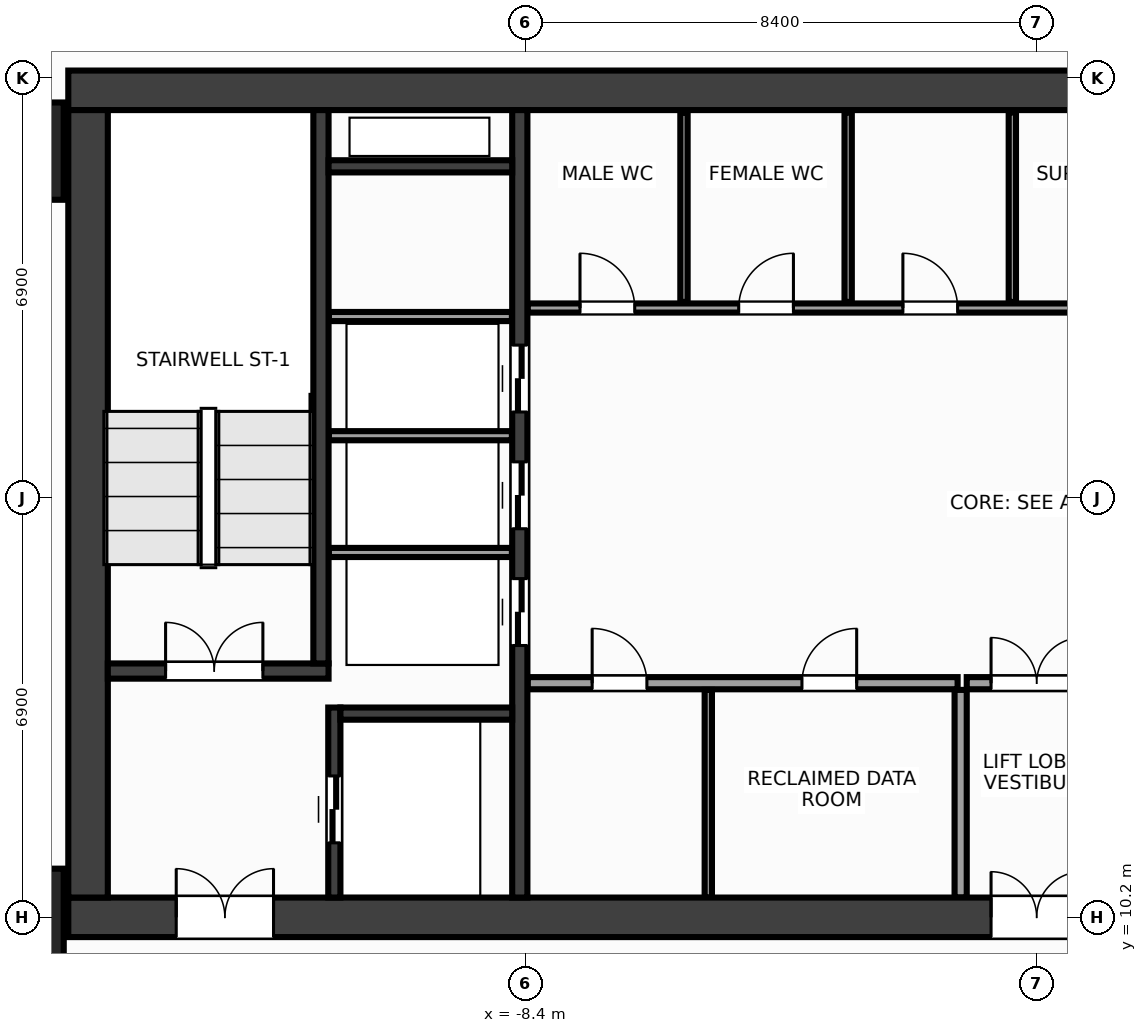
"""IFC4 building model, lengths in metres.
Left out: names, types, materials, properties, quantities, classifications, styles, units other than length and angle.
Written with IfcOpenShell. Run it as: python <this file> out.ifc"""

import sys

from ifc_helpers import new_model, si_unit, direction, frame, frame_2d, origin, origin_2d, place, context, subcontext, project, spatial, rectangle, extrude, source, transform, mapped, element, fill, save


model = new_model("IFC4")
c1 = context("Model", 3, precision=1e-05, world=origin(), true_north=direction((0.0, 1.0)))
c2 = subcontext(c1, "Body", "Model", "MODEL_VIEW")
j1 = project(units=[si_unit("LENGTHUNIT", "METRE"), si_unit("PLANEANGLEUNIT", "RADIAN")], contexts=[c1])
p1 = place(None, origin())
s1 = spatial("IfcSite", under=j1, at=p1, CompositionType="ELEMENT")
p2 = place(p1, origin())
s2 = spatial("IfcBuilding", under=s1, at=p2, CompositionType="ELEMENT")
p3 = place(p2, frame((0.0, 0.0, 182.0)))
s3 = spatial("IfcBuildingStorey", under=s2, at=p3, CompositionType="ELEMENT", Elevation=182.0)
m1 = source(origin(), c2, "Body", "SweptSolid", [
    extrude(rectangle(XDim=31.85, YDim=0.65, at=frame_2d((15.925, 0.0))), origin(), (0.0, 0.0, 1.0), 3.6),
])
p4 = place(p3, frame((-15.925, 23.8, 0.0), z_axis=(0.0, 0.0, 1.0), x_axis=(1.0, 0.0, 0.0)))
e1 = element("IfcWall", 1, at=p4, inside=s3, PredefinedType="SHEAR", context=c2, shape_type="MappedRepresentation", body=[
    mapped(m1, transform((0.0, 0.0, 0.0), x_axis=(1.0, 0.0, 0.0), y_axis=(0.0, 1.0, 0.0), z_axis=(0.0, 0.0, 1.0), scale=1.0)),
])
p5 = place(p3, frame((-15.925, 10.2, 0.0), z_axis=(0.0, 0.0, 1.0), x_axis=(1.0, 0.0, 0.0)))
e2 = element("IfcWall", 2, at=p5, inside=s3, PredefinedType="SHEAR", context=c2, shape_type="MappedRepresentation", body=[
    mapped(m1, transform((0.0, 0.0, 0.0), x_axis=(1.0, 0.0, 0.0), y_axis=(0.0, 1.0, 0.0), z_axis=(0.0, 0.0, 1.0), scale=1.0)),
])
p6 = place(p5, frame((1.775, 0.0, 0.0)))
e3 = element("IfcOpeningElement", 3, at=p6, cuts=e2, PredefinedType="OPENING", context=c2, shape_type="SweptSolid", body=[
    extrude(rectangle(XDim=1.6, YDim=2.15, at=frame_2d((0.8, 1.075))), frame((0.0, 0.337, 0.0), z_axis=(0.0, -1.0, 0.0), x_axis=(1.0, 0.0, 0.0)), (0.0, 0.0, 1.0), 0.674),
])
p7 = place(p5, frame((28.475, 0.0, 0.0)))
e4 = element("IfcOpeningElement", 4, at=p7, cuts=e2, PredefinedType="OPENING", context=c2, shape_type="SweptSolid", body=[
    extrude(rectangle(XDim=1.6, YDim=2.15, at=frame_2d((0.8, 1.075))), frame((0.0, 0.337, 0.0), z_axis=(0.0, -1.0, 0.0), x_axis=(1.0, 0.0, 0.0)), (0.0, 0.0, 1.0), 0.674),
])
p8 = place(p5, frame((15.175, 0.0, 0.0)))
e5 = element("IfcOpeningElement", 5, at=p8, cuts=e2, PredefinedType="OPENING", context=c2, shape_type="SweptSolid", body=[
    extrude(rectangle(XDim=1.5, YDim=2.2, at=frame_2d((0.75, 1.1))), frame((0.0, 0.337, 0.0), z_axis=(0.0, -1.0, 0.0), x_axis=(1.0, 0.0, 0.0)), (0.0, 0.0, 1.0), 0.674),
])
m2 = source(origin(), c2, "Body", "SweptSolid", [
    extrude(rectangle(XDim=12.95, YDim=0.65, at=frame_2d((6.475, 0.0))), origin(), (0.0, 0.0, 1.0), 3.6),
])
p9 = place(p3, frame((-15.6, 10.525, 0.0), z_axis=(0.0, 0.0, 1.0), x_axis=(0.0, 1.0, 0.0)))
e6 = element("IfcWall", 6, at=p9, inside=s3, PredefinedType="SHEAR", context=c2, shape_type="MappedRepresentation", body=[
    mapped(m2, transform((0.0, 0.0, 0.0), x_axis=(1.0, 0.0, 0.0), y_axis=(0.0, 1.0, 0.0), z_axis=(0.0, 0.0, 1.0), scale=1.0)),
])
m3 = source(origin(), c2, "Body", "SweptSolid", [
    extrude(rectangle(XDim=12.95, YDim=0.25, at=frame_2d((6.475, 0.0))), origin(), (0.0, 0.0, 1.0), 3.6),
])
p10 = place(p3, frame((-8.5, 10.525, 0.0), z_axis=(0.0, 0.0, 1.0), x_axis=(0.0, 1.0, 0.0)))
e7 = element("IfcWall", 7, at=p10, inside=s3, PredefinedType="SHEAR", context=c2, shape_type="MappedRepresentation", body=[
    mapped(m3, transform((0.0, 0.0, 0.0), x_axis=(1.0, 0.0, 0.0), y_axis=(0.0, 1.0, 0.0), z_axis=(0.0, 0.0, 1.0), scale=1.0)),
])
p11 = place(p10, frame((4.145, 0.0, 0.0)))
e8 = element("IfcOpeningElement", 8, at=p11, cuts=e7, PredefinedType="OPENING", context=c2, shape_type="SweptSolid", body=[
    extrude(rectangle(XDim=1.1, YDim=2.15, at=frame_2d((0.55, 1.075))), frame((0.0, 0.137, 0.0), z_axis=(0.0, -1.0, 0.0), x_axis=(1.0, 0.0, 0.0)), (0.0, 0.0, 1.0), 0.274),
])
p12 = place(p10, frame((6.065, 0.0, 0.0)))
e9 = element("IfcOpeningElement", 9, at=p12, cuts=e7, PredefinedType="OPENING", context=c2, shape_type="SweptSolid", body=[
    extrude(rectangle(XDim=1.1, YDim=2.15, at=frame_2d((0.55, 1.075))), frame((0.0, 0.137, 0.0), z_axis=(0.0, -1.0, 0.0), x_axis=(1.0, 0.0, 0.0)), (0.0, 0.0, 1.0), 0.274),
])
p13 = place(p10, frame((7.985, 0.0, 0.0)))
e10 = element("IfcOpeningElement", 10, at=p13, cuts=e7, PredefinedType="OPENING", context=c2, shape_type="SweptSolid", body=[
    extrude(rectangle(XDim=1.1, YDim=2.15, at=frame_2d((0.55, 1.075))), frame((0.0, 0.137, 0.0), z_axis=(0.0, -1.0, 0.0), x_axis=(1.0, 0.0, 0.0)), (0.0, 0.0, 1.0), 0.274),
])
m4 = source(origin(), c2, "Body", "SweptSolid", [
    extrude(rectangle(XDim=3.63, YDim=0.25, at=frame_2d((1.815, 0.0))), origin(), (0.0, 0.0, 1.0), 3.6),
])
p14 = place(p3, frame((-15.275, 14.25, 0.0), z_axis=(0.0, 0.0, 1.0), x_axis=(1.0, 0.0, 0.0)))
e11 = element("IfcWall", 11, at=p14, inside=s3, PredefinedType="SHEAR", context=c2, shape_type="MappedRepresentation", body=[
    mapped(m4, transform((0.0, 0.0, 0.0), x_axis=(1.0, 0.0, 0.0), y_axis=(0.0, 1.0, 0.0), z_axis=(0.0, 0.0, 1.0), scale=1.0)),
])
p15 = place(p14, frame((0.95, 0.0, 0.0)))
e12 = element("IfcOpeningElement", 12, at=p15, cuts=e11, PredefinedType="OPENING", context=c2, shape_type="SweptSolid", body=[
    extrude(rectangle(XDim=1.6, YDim=2.15, at=frame_2d((0.8, 1.075))), frame((0.0, 0.137, 0.0), z_axis=(0.0, -1.0, 0.0), x_axis=(1.0, 0.0, 0.0)), (0.0, 0.0, 1.0), 0.274),
])
m5 = source(origin(), c2, "Body", "SweptSolid", [
    extrude(rectangle(XDim=9.1, YDim=0.25, at=frame_2d((4.55, 0.0))), origin(), (0.0, 0.0, 1.0), 3.6),
])
p16 = place(p3, frame((-11.77, 14.375, 0.0), z_axis=(0.0, 0.0, 1.0), x_axis=(0.0, 1.0, 0.0)))
e13 = element("IfcWall", 13, at=p16, inside=s3, PredefinedType="SHEAR", context=c2, shape_type="MappedRepresentation", body=[
    mapped(m5, transform((0.0, 0.0, 0.0), x_axis=(1.0, 0.0, 0.0), y_axis=(0.0, 1.0, 0.0), z_axis=(0.0, 0.0, 1.0), scale=1.0)),
])
m6 = source(origin(), c2, "Body", "SweptSolid", [
    extrude(rectangle(XDim=3.125, YDim=0.2, at=frame_2d((1.562, 0.0))), origin(), (0.0, 0.0, 1.0), 3.6),
])
p17 = place(p3, frame((-11.55, 10.525, 0.0), z_axis=(0.0, 0.0, 1.0), x_axis=(0.0, 1.0, 0.0)))
e14 = element("IfcWall", 14, at=p17, inside=s3, PredefinedType="SHEAR", context=c2, shape_type="MappedRepresentation", body=[
    mapped(m6, transform((0.0, 0.0, 0.0), x_axis=(1.0, 0.0, 0.0), y_axis=(0.0, 1.0, 0.0), z_axis=(0.0, 0.0, 1.0), scale=1.0)),
])
p18 = place(p17, frame((0.9, 0.0, 0.0)))
e15 = element("IfcOpeningElement", 15, at=p18, cuts=e14, PredefinedType="OPENING", context=c2, shape_type="SweptSolid", body=[
    extrude(rectangle(XDim=1.1, YDim=2.15, at=frame_2d((0.55, 1.075))), frame((0.0, 0.112, 0.0), z_axis=(0.0, -1.0, 0.0), x_axis=(1.0, 0.0, 0.0)), (0.0, 0.0, 1.0), 0.224),
])
m7 = source(origin(), c2, "Body", "SweptSolid", [
    extrude(rectangle(XDim=2.825, YDim=0.2, at=frame_2d((1.413, 0.0))), origin(), (0.0, 0.0, 1.0), 3.6),
])
p19 = place(p3, frame((-11.45, 13.55, 0.0), z_axis=(0.0, 0.0, 1.0), x_axis=(1.0, 0.0, 0.0)))
e16 = element("IfcWall", 16, at=p19, inside=s3, PredefinedType="SHEAR", context=c2, shape_type="MappedRepresentation", body=[
    mapped(m7, transform((0.0, 0.0, 0.0), x_axis=(1.0, 0.0, 0.0), y_axis=(0.0, 1.0, 0.0), z_axis=(0.0, 0.0, 1.0), scale=1.0)),
])
m8 = source(origin(), c2, "Body", "SweptSolid", [
    extrude(rectangle(XDim=3.02, YDim=0.2, at=frame_2d((1.51, 0.0))), origin(), (0.0, 0.0, 1.0), 3.6),
])
p20 = place(p3, frame((-11.645, 22.55, 0.0), z_axis=(0.0, 0.0, 1.0), x_axis=(1.0, 0.0, 0.0)))
e17 = element("IfcWall", 17, at=p20, inside=s3, PredefinedType="SHEAR", context=c2, shape_type="MappedRepresentation", body=[
    mapped(m8, transform((0.0, 0.0, 0.0), x_axis=(1.0, 0.0, 0.0), y_axis=(0.0, 1.0, 0.0), z_axis=(0.0, 0.0, 1.0), scale=1.0)),
])
m9 = source(origin(), c2, "Body", "SweptSolid", [
    extrude(rectangle(XDim=1.6, YDim=1.6, at=origin_2d()), origin(), (0.0, 0.0, 1.0), 3.6),
])
for number, where, z_axis, x_axis in (
    (18, (-16.8, 10.2, 0.0), (0.0, 0.0, 1.0), (1.0, 0.0, 0.0)),
    (19, (-16.8, 22.8, 0.0), (0.0, 0.0, 1.0), (1.0, 0.0, 0.0)),
):
    element("IfcColumn", number, at=place(p3, frame(where, z_axis=z_axis, x_axis=x_axis)), inside=s3, PredefinedType="COLUMN", context=c2, shape_type="MappedRepresentation", body=[
        mapped(m9, transform((0.0, 0.0, 0.0), x_axis=(1.0, 0.0, 0.0), y_axis=(0.0, 1.0, 0.0), z_axis=(0.0, 0.0, 1.0), scale=1.0)),
    ])
m10 = source(origin(), c2, "Body", "SweptSolid", [
    extrude(rectangle(XDim=3.01, YDim=0.15, at=frame_2d((1.505, 0.0))), origin(), (0.0, 0.0, 1.0), 3.38),
])
for number, where, z_axis, x_axis in (
    (20, (-11.64, 16.2, 0.0), (0.0, 0.0, 1.0), (1.0, 0.0, 0.0)),
    (21, (-11.64, 18.12, 0.0), (0.0, 0.0, 1.0), (1.0, 0.0, 0.0)),
    (22, (-11.64, 20.08, 0.0), (0.0, 0.0, 1.0), (1.0, 0.0, 0.0)),
):
    element("IfcWall", number, at=place(p3, frame(where, z_axis=z_axis, x_axis=x_axis)), inside=s3, PredefinedType="PARTITIONING", context=c2, shape_type="MappedRepresentation", body=[
        mapped(m10, transform((0.0, 0.0, 0.0), x_axis=(1.0, 0.0, 0.0), y_axis=(0.0, 1.0, 0.0), z_axis=(0.0, 0.0, 1.0), scale=1.0)),
    ])
m11 = source(origin(), c2, "Body", "SweptSolid", [
    extrude(rectangle(XDim=7.07, YDim=0.2, at=frame_2d((3.535, 0.0))), origin(), (0.0, 0.0, 1.0), 3.38),
])
p21 = place(p3, frame((-8.37, 14.05, 0.0), z_axis=(0.0, 0.0, 1.0), x_axis=(1.0, 0.0, 0.0)))
e23 = element("IfcWall", 23, at=p21, inside=s3, PredefinedType="PARTITIONING", context=c2, shape_type="MappedRepresentation", body=[
    mapped(m11, transform((0.0, 0.0, 0.0), x_axis=(1.0, 0.0, 0.0), y_axis=(0.0, 1.0, 0.0), z_axis=(0.0, 0.0, 1.0), scale=1.0)),
])
p22 = place(p21, frame((1.06, 0.0, 0.0)))
e24 = element("IfcOpeningElement", 24, at=p22, cuts=e23, PredefinedType="OPENING", context=c2, shape_type="SweptSolid", body=[
    extrude(rectangle(XDim=0.9, YDim=2.15, at=frame_2d((0.45, 1.075))), frame((0.0, 0.112, 0.0), z_axis=(0.0, -1.0, 0.0), x_axis=(1.0, 0.0, 0.0)), (0.0, 0.0, 1.0), 0.224),
])
p23 = place(p21, frame((4.51, 0.0, 0.0)))
e25 = element("IfcOpeningElement", 25, at=p23, cuts=e23, PredefinedType="OPENING", context=c2, shape_type="SweptSolid", body=[
    extrude(rectangle(XDim=0.9, YDim=2.15, at=frame_2d((0.45, 1.075))), frame((0.0, 0.112, 0.0), z_axis=(0.0, -1.0, 0.0), x_axis=(1.0, 0.0, 0.0)), (0.0, 0.0, 1.0), 0.224),
])
m12 = source(origin(), c2, "Body", "SweptSolid", [
    extrude(rectangle(XDim=3.415, YDim=0.2, at=frame_2d((1.708, 0.0))), origin(), (0.0, 0.0, 1.0), 3.38),
])
p24 = place(p3, frame((-1.25, 10.525, 0.0), z_axis=(0.0, 0.0, 1.0), x_axis=(0.0, 1.0, 0.0)))
e26 = element("IfcWall", 26, at=p24, inside=s3, PredefinedType="PARTITIONING", context=c2, shape_type="MappedRepresentation", body=[
    mapped(m12, transform((0.0, 0.0, 0.0), x_axis=(1.0, 0.0, 0.0), y_axis=(0.0, 1.0, 0.0), z_axis=(0.0, 0.0, 1.0), scale=1.0)),
])
m13 = source(origin(), c2, "Body", "SweptSolid", [
    extrude(rectangle(XDim=2.3, YDim=0.2, at=frame_2d((1.15, 0.0))), origin(), (0.0, 0.0, 1.0), 3.38),
])
p25 = place(p3, frame((-1.15, 14.05, 0.0), z_axis=(0.0, 0.0, 1.0), x_axis=(1.0, 0.0, 0.0)))
e27 = element("IfcWall", 27, at=p25, inside=s3, PredefinedType="PARTITIONING", context=c2, shape_type="MappedRepresentation", body=[
    mapped(m13, transform((0.0, 0.0, 0.0), x_axis=(1.0, 0.0, 0.0), y_axis=(0.0, 1.0, 0.0), z_axis=(0.0, 0.0, 1.0), scale=1.0)),
])
p26 = place(p25, frame((0.4, 0.0, 0.0)))
e28 = element("IfcOpeningElement", 28, at=p26, cuts=e27, PredefinedType="OPENING", context=c2, shape_type="SweptSolid", body=[
    extrude(rectangle(XDim=1.5, YDim=2.2, at=frame_2d((0.75, 1.1))), frame((0.0, 0.112, 0.0), z_axis=(0.0, -1.0, 0.0), x_axis=(1.0, 0.0, 0.0)), (0.0, 0.0, 1.0), 0.224),
])
m14 = source(origin(), c2, "Body", "SweptSolid", [
    extrude(rectangle(XDim=14.59, YDim=0.15, at=frame_2d((7.295, 0.0))), origin(), (0.0, 0.0, 1.0), 3.38),
])
p27 = place(p3, frame((-8.37, 20.22, 0.0), z_axis=(0.0, 0.0, 1.0), x_axis=(1.0, 0.0, 0.0)))
e29 = element("IfcWall", 29, at=p27, inside=s3, PredefinedType="PARTITIONING", context=c2, shape_type="MappedRepresentation", body=[
    mapped(m14, transform((0.0, 0.0, 0.0), x_axis=(1.0, 0.0, 0.0), y_axis=(0.0, 1.0, 0.0), z_axis=(0.0, 0.0, 1.0), scale=1.0)),
])
p28 = place(p27, frame((0.86, 0.0, 0.0)))
e30 = element("IfcOpeningElement", 30, at=p28, cuts=e29, PredefinedType="OPENING", context=c2, shape_type="SweptSolid", body=[
    extrude(rectangle(XDim=0.9, YDim=2.15, at=frame_2d((0.45, 1.075))), frame((0.0, 0.087, 0.0), z_axis=(0.0, -1.0, 0.0), x_axis=(1.0, 0.0, 0.0)), (0.0, 0.0, 1.0), 0.174),
])
p29 = place(p27, frame((3.47, 0.0, 0.0)))
e31 = element("IfcOpeningElement", 31, at=p29, cuts=e29, PredefinedType="OPENING", context=c2, shape_type="SweptSolid", body=[
    extrude(rectangle(XDim=0.9, YDim=2.15, at=frame_2d((0.45, 1.075))), frame((0.0, 0.087, 0.0), z_axis=(0.0, -1.0, 0.0), x_axis=(1.0, 0.0, 0.0)), (0.0, 0.0, 1.0), 0.174),
])
p30 = place(p27, frame((6.17, 0.0, 0.0)))
e32 = element("IfcOpeningElement", 32, at=p30, cuts=e29, PredefinedType="OPENING", context=c2, shape_type="SweptSolid", body=[
    extrude(rectangle(XDim=0.9, YDim=2.15, at=frame_2d((0.45, 1.075))), frame((0.0, 0.087, 0.0), z_axis=(0.0, -1.0, 0.0), x_axis=(1.0, 0.0, 0.0)), (0.0, 0.0, 1.0), 0.174),
])
p31 = place(p27, frame((9.07, 0.0, 0.0)))
e33 = element("IfcOpeningElement", 33, at=p31, cuts=e29, PredefinedType="OPENING", context=c2, shape_type="SweptSolid", body=[
    extrude(rectangle(XDim=0.9, YDim=2.15, at=frame_2d((0.45, 1.075))), frame((0.0, 0.087, 0.0), z_axis=(0.0, -1.0, 0.0), x_axis=(1.0, 0.0, 0.0)), (0.0, 0.0, 1.0), 0.174),
])
p32 = place(p27, frame((12.32, 0.0, 0.0)))
e34 = element("IfcOpeningElement", 34, at=p32, cuts=e29, PredefinedType="OPENING", context=c2, shape_type="SweptSolid", body=[
    extrude(rectangle(XDim=0.9, YDim=2.15, at=frame_2d((0.45, 1.075))), frame((0.0, 0.087, 0.0), z_axis=(0.0, -1.0, 0.0), x_axis=(1.0, 0.0, 0.0)), (0.0, 0.0, 1.0), 0.174),
])
m15 = source(origin(), c2, "Body", "SweptSolid", [
    extrude(rectangle(XDim=3.415, YDim=0.12, at=frame_2d((1.708, 0.0))), origin(), (0.0, 0.0, 1.0), 3.38),
])
p33 = place(p3, frame((-5.4, 10.525, 0.0), z_axis=(0.0, 0.0, 1.0), x_axis=(0.0, 1.0, 0.0)))
e35 = element("IfcWall", 35, at=p33, inside=s3, PredefinedType="PARTITIONING", context=c2, shape_type="MappedRepresentation", body=[
    mapped(m15, transform((0.0, 0.0, 0.0), x_axis=(1.0, 0.0, 0.0), y_axis=(0.0, 1.0, 0.0), z_axis=(0.0, 0.0, 1.0), scale=1.0)),
])
m16 = source(origin(), c2, "Body", "SweptSolid", [
    extrude(rectangle(XDim=3.115, YDim=0.12, at=frame_2d((1.558, 0.0))), origin(), (0.0, 0.0, 1.0), 3.38),
])
for number, where, z_axis, x_axis in (
    (36, (-5.8, 20.32, 0.0), (0.0, 0.0, 1.0), (0.0, 1.0, 0.0)),
    (37, (-3.1, 20.32, 0.0), (0.0, 0.0, 1.0), (0.0, 1.0, 0.0)),
    (38, (-0.4, 20.32, 0.0), (0.0, 0.0, 1.0), (0.0, 1.0, 0.0)),
):
    element("IfcWall", number, at=place(p3, frame(where, z_axis=z_axis, x_axis=x_axis)), inside=s3, PredefinedType="PARTITIONING", context=c2, shape_type="MappedRepresentation", body=[
        mapped(m16, transform((0.0, 0.0, 0.0), x_axis=(1.0, 0.0, 0.0), y_axis=(0.0, 1.0, 0.0), z_axis=(0.0, 0.0, 1.0), scale=1.0)),
    ])
m17 = source(origin(), c2, "Body", "SweptSolid", [
    extrude(rectangle(XDim=1.6, YDim=2.15, at=frame_2d((0.8, 1.075))), frame((0.0, 0.025, 0.0), z_axis=(0.0, -1.0, 0.0), x_axis=(1.0, 0.0, 0.0)), (0.0, 0.0, 1.0), 0.05),
])
p34 = place(p15, origin())
e39 = element("IfcDoor", 39, at=p34, inside=s3, OperationType="DOUBLE_DOOR_SINGLE_SWING", PredefinedType="DOOR", context=c2, shape_type="MappedRepresentation", body=[
    mapped(m17, transform((0.0, 0.0, 0.0), x_axis=(1.0, 0.0, 0.0), y_axis=(0.0, 1.0, 0.0), z_axis=(0.0, 0.0, 1.0), scale=1.0)),
])
fill(e12, e39)
p35 = place(p6, origin())
e40 = element("IfcDoor", 40, at=p35, inside=s3, OperationType="DOUBLE_DOOR_SINGLE_SWING", PredefinedType="DOOR", context=c2, shape_type="MappedRepresentation", body=[
    mapped(m17, transform((0.0, 0.0, 0.0), x_axis=(1.0, 0.0, 0.0), y_axis=(0.0, 1.0, 0.0), z_axis=(0.0, 0.0, 1.0), scale=1.0)),
])
fill(e3, e40)
m18 = source(origin(), c2, "Body", "SweptSolid", [
    extrude(rectangle(XDim=1.1, YDim=2.15, at=frame_2d((0.55, 1.075))), frame((0.0, 0.025, 0.0), z_axis=(0.0, -1.0, 0.0), x_axis=(1.0, 0.0, 0.0)), (0.0, 0.0, 1.0), 0.05),
])
p36 = place(p18, origin())
e41 = element("IfcDoor", 41, at=p36, inside=s3, OperationType="DOUBLE_DOOR_SLIDING", PredefinedType="DOOR", context=c2, shape_type="MappedRepresentation", body=[
    mapped(m18, transform((0.0, 0.0, 0.0), x_axis=(1.0, 0.0, 0.0), y_axis=(0.0, 1.0, 0.0), z_axis=(0.0, 0.0, 1.0), scale=1.0)),
])
fill(e15, e41)
p37 = place(p11, origin())
e42 = element("IfcDoor", 42, at=p37, inside=s3, OperationType="DOUBLE_DOOR_SLIDING", PredefinedType="DOOR", context=c2, shape_type="MappedRepresentation", body=[
    mapped(m18, transform((0.0, 0.0, 0.0), x_axis=(1.0, 0.0, 0.0), y_axis=(0.0, 1.0, 0.0), z_axis=(0.0, 0.0, 1.0), scale=1.0)),
])
fill(e8, e42)
p38 = place(p12, origin())
e43 = element("IfcDoor", 43, at=p38, inside=s3, OperationType="DOUBLE_DOOR_SLIDING", PredefinedType="DOOR", context=c2, shape_type="MappedRepresentation", body=[
    mapped(m18, transform((0.0, 0.0, 0.0), x_axis=(1.0, 0.0, 0.0), y_axis=(0.0, 1.0, 0.0), z_axis=(0.0, 0.0, 1.0), scale=1.0)),
])
fill(e9, e43)
p39 = place(p13, origin())
e44 = element("IfcDoor", 44, at=p39, inside=s3, OperationType="DOUBLE_DOOR_SLIDING", PredefinedType="DOOR", context=c2, shape_type="MappedRepresentation", body=[
    mapped(m18, transform((0.0, 0.0, 0.0), x_axis=(1.0, 0.0, 0.0), y_axis=(0.0, 1.0, 0.0), z_axis=(0.0, 0.0, 1.0), scale=1.0)),
])
fill(e10, e44)
m19 = source(origin(), c2, "Body", "SweptSolid", [
    extrude(rectangle(XDim=0.9, YDim=2.15, at=frame_2d((0.45, 1.075))), frame((0.0, 0.025, 0.0), z_axis=(0.0, -1.0, 0.0), x_axis=(1.0, 0.0, 0.0)), (0.0, 0.0, 1.0), 0.05),
])
p40 = place(p22, origin())
e45 = element("IfcDoor", 45, at=p40, inside=s3, OperationType="SINGLE_SWING_LEFT", PredefinedType="DOOR", context=c2, shape_type="MappedRepresentation", body=[
    mapped(m19, transform((0.0, 0.0, 0.0), x_axis=(1.0, 0.0, 0.0), y_axis=(0.0, 1.0, 0.0), z_axis=(0.0, 0.0, 1.0), scale=1.0)),
])
fill(e24, e45)
p41 = place(p23, origin())
e46 = element("IfcDoor", 46, at=p41, inside=s3, OperationType="SINGLE_SWING_RIGHT", PredefinedType="DOOR", context=c2, shape_type="MappedRepresentation", body=[
    mapped(m19, transform((0.0, 0.0, 0.0), x_axis=(1.0, 0.0, 0.0), y_axis=(0.0, 1.0, 0.0), z_axis=(0.0, 0.0, 1.0), scale=1.0)),
])
fill(e25, e46)
m20 = source(origin(), c2, "Body", "SweptSolid", [
    extrude(rectangle(XDim=1.5, YDim=2.2, at=frame_2d((0.75, 1.1))), frame((0.0, 0.025, 0.0), z_axis=(0.0, -1.0, 0.0), x_axis=(1.0, 0.0, 0.0)), (0.0, 0.0, 1.0), 0.05),
])
p42 = place(p26, origin())
e47 = element("IfcDoor", 47, at=p42, inside=s3, OperationType="DOUBLE_DOOR_SINGLE_SWING", PredefinedType="DOOR", context=c2, shape_type="MappedRepresentation", body=[
    mapped(m20, transform((0.0, 0.0, 0.0), x_axis=(1.0, 0.0, 0.0), y_axis=(0.0, 1.0, 0.0), z_axis=(0.0, 0.0, 1.0), scale=1.0)),
])
fill(e28, e47)
p43 = place(p8, origin())
e48 = element("IfcDoor", 48, at=p43, inside=s3, OperationType="DOUBLE_DOOR_SINGLE_SWING", PredefinedType="DOOR", context=c2, shape_type="MappedRepresentation", body=[
    mapped(m20, transform((0.0, 0.0, 0.0), x_axis=(1.0, 0.0, 0.0), y_axis=(0.0, 1.0, 0.0), z_axis=(0.0, 0.0, 1.0), scale=1.0)),
])
fill(e5, e48)
p44 = place(p28, origin())
e49 = element("IfcDoor", 49, at=p44, inside=s3, OperationType="SINGLE_SWING_LEFT", PredefinedType="DOOR", context=c2, shape_type="MappedRepresentation", body=[
    mapped(m19, transform((0.0, 0.0, 0.0), x_axis=(1.0, 0.0, 0.0), y_axis=(0.0, 1.0, 0.0), z_axis=(0.0, 0.0, 1.0), scale=1.0)),
])
fill(e30, e49)
p45 = place(p29, origin())
e50 = element("IfcDoor", 50, at=p45, inside=s3, OperationType="SINGLE_SWING_RIGHT", PredefinedType="DOOR", context=c2, shape_type="MappedRepresentation", body=[
    mapped(m19, transform((0.0, 0.0, 0.0), x_axis=(1.0, 0.0, 0.0), y_axis=(0.0, 1.0, 0.0), z_axis=(0.0, 0.0, 1.0), scale=1.0)),
])
fill(e31, e50)
p46 = place(p30, origin())
e51 = element("IfcDoor", 51, at=p46, inside=s3, OperationType="SINGLE_SWING_LEFT", PredefinedType="DOOR", context=c2, shape_type="MappedRepresentation", body=[
    mapped(m19, transform((0.0, 0.0, 0.0), x_axis=(1.0, 0.0, 0.0), y_axis=(0.0, 1.0, 0.0), z_axis=(0.0, 0.0, 1.0), scale=1.0)),
])
fill(e32, e51)
save(model, sys.argv[1])
